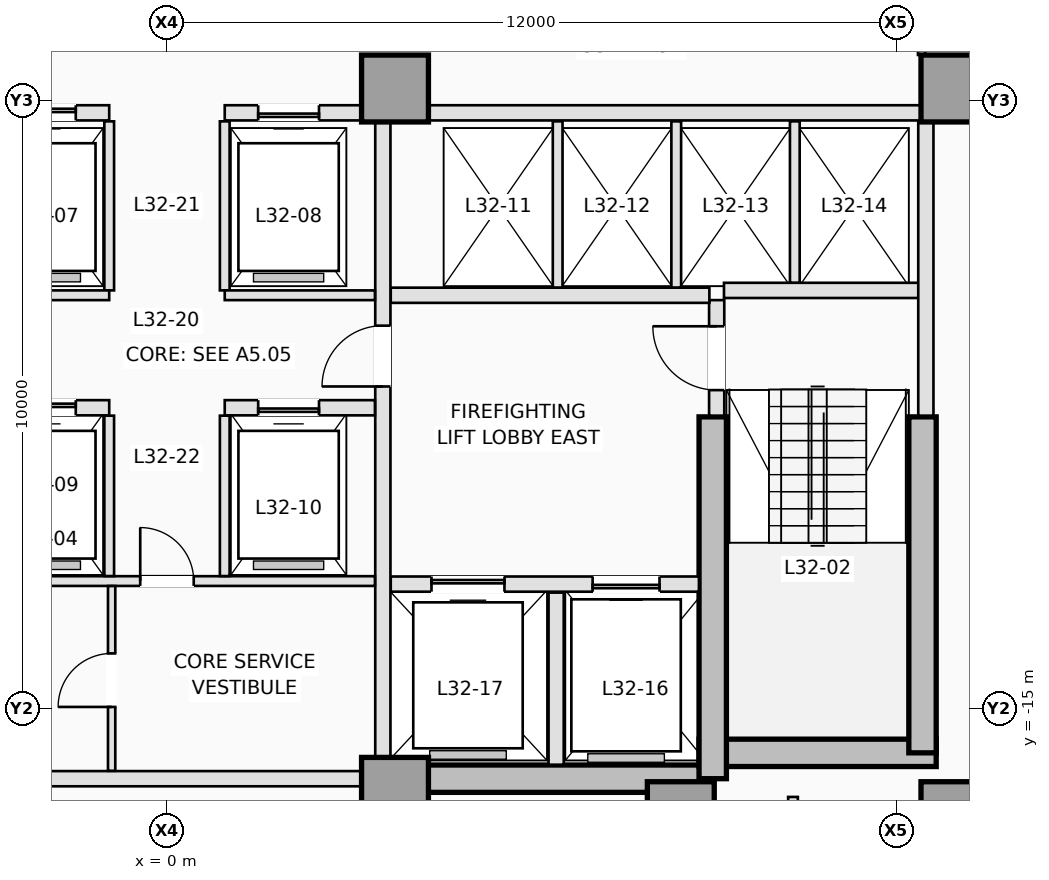
"""IFC4 building model, lengths in metres.
Left out: names, types, materials, properties, quantities, classifications, styles, units other than length and angle.
Written with IfcOpenShell. Run it as: python <this file> out.ifc"""

import sys

from ifc_helpers import new_model, si_unit, direction, frame, frame_2d, origin, origin_2d, place, context, subcontext, project, spatial, rectangle, extrude, element, fill, save


model = new_model("IFC4")
c1 = context("Model", 3, precision=1e-05, world=origin(), true_north=direction((0.0, 1.0)))
c2 = subcontext(c1, "Body", "Model", "MODEL_VIEW")
j1 = project(units=[si_unit("LENGTHUNIT", "METRE"), si_unit("PLANEANGLEUNIT", "RADIAN")], contexts=[c1])
p1 = place(None, origin())
s1 = spatial("IfcSite", under=j1, at=p1, CompositionType="ELEMENT")
p2 = place(p1, origin())
s2 = spatial("IfcBuilding", under=s1, at=p2, CompositionType="ELEMENT")
p3 = place(p2, frame((0.0, 0.0, 119.5)))
s3 = spatial("IfcBuildingStorey", under=s2, at=p3, CompositionType="ELEMENT", Elevation=119.5)
p4 = place(p3, frame((3.75, -16.15, 0.0), z_axis=(0.0, 0.0, 1.0), x_axis=(1.0, 0.0, 0.0)))
e1 = element("IfcWall", 1, at=p4, inside=s3, PredefinedType="SHEAR", context=c2, shape_type="SweptSolid", body=[
    extrude(rectangle(XDim=5.225, YDim=0.45, at=frame_2d((2.613, 0.0))), origin(), (0.0, 0.0, 1.0), 3.5),
])
p5 = place(p3, frame((8.75, -15.725, 0.0), z_axis=(0.0, 0.0, 1.0), x_axis=(1.0, 0.0, 0.0)))
e2 = element("IfcWall", 2, at=p5, inside=s3, PredefinedType="SHEAR", context=c2, shape_type="SweptSolid", body=[
    extrude(rectangle(XDim=3.9, YDim=0.45, at=frame_2d((1.95, 0.0))), origin(), (0.0, 0.0, 1.0), 3.5),
])
p6 = place(p3, frame((12.425, -15.725, 0.0), z_axis=(0.0, 0.0, 1.0), x_axis=(0.0, 1.0, 0.0)))
e3 = element("IfcWall", 3, at=p6, inside=s3, PredefinedType="SHEAR", context=c2, shape_type="SweptSolid", body=[
    extrude(rectangle(XDim=5.525, YDim=0.45, at=frame_2d((2.763, 0.0))), origin(), (0.0, 0.0, 1.0), 3.5),
])
p7 = place(p3, frame((8.975, -16.15, 0.0), z_axis=(0.0, 0.0, 1.0), x_axis=(0.0, 1.0, 0.0)))
e4 = element("IfcWall", 4, at=p7, inside=s3, PredefinedType="SHEAR", context=c2, shape_type="SweptSolid", body=[
    extrude(rectangle(XDim=5.95, YDim=0.45, at=frame_2d((2.975, 0.0))), origin(), (0.0, 0.0, 1.0), 3.5),
])
for number, where, z_axis, x_axis in (
    (5, (3.75, -16.35, 0.0), (0.0, 0.0, 1.0), (1.0, 0.0, 0.0)),
    (6, (8.45, -16.75, 0.0), (0.0, 0.0, 1.0), (1.0, 0.0, 0.0)),
    (7, (12.95, -16.75, 0.0), (0.0, 0.0, 1.0), (1.0, 0.0, 0.0)),
    (8, (3.75, -4.8, 0.0), (0.0, 0.0, 1.0), (1.0, 0.0, 0.0)),
    (9, (12.95, -4.8, 0.0), (0.0, 0.0, 1.0), (1.0, 0.0, 0.0)),
):
    element("IfcColumn", number, at=place(p3, frame(where, z_axis=z_axis, x_axis=x_axis)), inside=s3, PredefinedType="COLUMN", context=c2, shape_type="SweptSolid", body=[
        extrude(rectangle(XDim=1.1, YDim=1.1, at=origin_2d()), origin(), (0.0, 0.0, 1.0), 3.5),
    ])
p8 = place(p3, frame((9.04, -10.18, 0.0), z_axis=(0.0, 0.0, 1.0), x_axis=(0.0, 1.0, 0.0)))
e10 = element("IfcWall", 10, at=p8, inside=s3, PredefinedType="PARTITIONING", context=c2, shape_type="SweptSolid", body=[
    extrude(rectangle(XDim=1.9, YDim=0.25, at=frame_2d((0.95, 0.0))), origin(), (0.0, 0.0, 1.0), 3.25),
])
p9 = place(p8, frame((0.42, 0.0, 0.0)))
e11 = element("IfcOpeningElement", 11, at=p9, cuts=e10, PredefinedType="OPENING", context=c2, shape_type="SweptSolid", body=[
    extrude(rectangle(XDim=1.05, YDim=2.15, at=frame_2d((0.525, 1.075))), frame((0.0, 0.135, 0.0), z_axis=(0.0, -1.0, 0.0), x_axis=(1.0, 0.0, 0.0)), (0.0, 0.0, 1.0), 0.27),
])
p10 = place(p3, frame((9.16, -8.12, 0.0), z_axis=(0.0, 0.0, 1.0), x_axis=(1.0, 0.0, 0.0)))
e12 = element("IfcWall", 12, at=p10, inside=s3, PredefinedType="PARTITIONING", context=c2, shape_type="SweptSolid", body=[
    extrude(rectangle(XDim=3.22, YDim=0.25, at=frame_2d((1.61, 0.0))), origin(), (0.0, 0.0, 1.0), 3.25),
])
p11 = place(p3, frame((12.48, -10.18, 0.0), z_axis=(0.0, 0.0, 1.0), x_axis=(0.0, 1.0, 0.0)))
e13 = element("IfcWall", 13, at=p11, inside=s3, PredefinedType="PARTITIONING", context=c2, shape_type="SweptSolid", body=[
    extrude(rectangle(XDim=4.828, YDim=0.25, at=frame_2d((2.414, 0.0))), origin(), (0.0, 0.0, 1.0), 3.25),
])
p12 = place(p3, frame((3.68, -12.95, 0.0), z_axis=(0.0, 0.0, 1.0), x_axis=(1.0, 0.0, 0.0)))
e14 = element("IfcWall", 14, at=p12, inside=s3, PredefinedType="PARTITIONING", context=c2, shape_type="SweptSolid", body=[
    extrude(rectangle(XDim=5.068, YDim=0.25, at=frame_2d((2.534, 0.0))), origin(), (0.0, 0.0, 1.0), 3.25),
])
p13 = place(p12, frame((3.32, 0.0, 0.0)))
e15 = element("IfcOpeningElement", 15, at=p13, cuts=e14, PredefinedType="OPENING", context=c2, shape_type="SweptSolid", body=[
    extrude(rectangle(XDim=1.1, YDim=2.15, at=frame_2d((0.55, 1.075))), frame((0.0, 0.135, 0.0), z_axis=(0.0, -1.0, 0.0), x_axis=(1.0, 0.0, 0.0)), (0.0, 0.0, 1.0), 0.27),
])
p14 = place(p12, frame((0.67, 0.0, 0.0)))
e16 = element("IfcOpeningElement", 16, at=p14, cuts=e14, PredefinedType="OPENING", context=c2, shape_type="SweptSolid", body=[
    extrude(rectangle(XDim=1.2, YDim=2.15, at=frame_2d((0.6, 1.075))), frame((0.0, 0.135, 0.0), z_axis=(0.0, -1.0, 0.0), x_axis=(1.0, 0.0, 0.0)), (0.0, 0.0, 1.0), 0.27),
])
p15 = place(p3, frame((6.4, -15.92, 0.0), z_axis=(0.0, 0.0, 1.0), x_axis=(0.0, 1.0, 0.0)))
e17 = element("IfcWall", 17, at=p15, inside=s3, PredefinedType="PARTITIONING", context=c2, shape_type="SweptSolid", body=[
    extrude(rectangle(XDim=2.83, YDim=0.25, at=frame_2d((1.415, 0.0))), origin(), (0.0, 0.0, 1.0), 3.25),
])
p16 = place(p3, frame((3.68, -8.2, 0.0), z_axis=(0.0, 0.0, 1.0), x_axis=(1.0, 0.0, 0.0)))
e18 = element("IfcWall", 18, at=p16, inside=s3, PredefinedType="PARTITIONING", context=c2, shape_type="SweptSolid", body=[
    extrude(rectangle(XDim=5.24, YDim=0.25, at=frame_2d((2.62, 0.0))), origin(), (0.0, 0.0, 1.0), 3.25),
])
p17 = place(p3, frame((3.55, -15.798, 0.0), z_axis=(0.0, 0.0, 1.0), x_axis=(0.0, 1.0, 0.0)))
e19 = element("IfcWall", 19, at=p17, inside=s3, PredefinedType="PARTITIONING", context=c2, shape_type="SweptSolid", body=[
    extrude(rectangle(XDim=10.446, YDim=0.25, at=frame_2d((5.223, 0.0))), origin(), (0.0, 0.0, 1.0), 3.25),
])
p18 = place(p17, frame((6.098, 0.0, 0.0)))
e20 = element("IfcOpeningElement", 20, at=p18, cuts=e19, PredefinedType="OPENING", context=c2, shape_type="SweptSolid", body=[
    extrude(rectangle(XDim=1.0, YDim=2.15, at=frame_2d((0.5, 1.075))), frame((0.0, 0.135, 0.0), z_axis=(0.0, -1.0, 0.0), x_axis=(1.0, 0.0, 0.0)), (0.0, 0.0, 1.0), 0.27),
])
p19 = place(p3, frame((4.302, -5.2, 0.0), z_axis=(0.0, 0.0, 1.0), x_axis=(1.0, 0.0, 0.0)))
e21 = element("IfcWall", 21, at=p19, inside=s3, PredefinedType="PARTITIONING", context=c2, shape_type="SweptSolid", body=[
    extrude(rectangle(XDim=8.096, YDim=0.25, at=frame_2d((4.048, 0.0))), origin(), (0.0, 0.0, 1.0), 3.25),
])
p20 = place(p3, frame((-3.198, -5.2, 0.0), z_axis=(0.0, 0.0, 1.0), x_axis=(1.0, 0.0, 0.0)))
e22 = element("IfcWall", 22, at=p20, inside=s3, PredefinedType="PARTITIONING", context=c2, shape_type="SweptSolid", body=[
    extrude(rectangle(XDim=2.248, YDim=0.25, at=frame_2d((1.124, 0.0))), origin(), (0.0, 0.0, 1.0), 3.25),
])
p21 = place(p20, frame((0.698, 0.0, 0.0)))
e23 = element("IfcOpeningElement", 23, at=p21, cuts=e22, PredefinedType="OPENING", context=c2, shape_type="SweptSolid", body=[
    extrude(rectangle(XDim=1.0, YDim=2.15, at=frame_2d((0.5, 1.075))), frame((0.0, 0.135, 0.0), z_axis=(0.0, -1.0, 0.0), x_axis=(1.0, 0.0, 0.0)), (0.0, 0.0, 1.0), 0.27),
])
p22 = place(p3, frame((0.95, -5.2, 0.0), z_axis=(0.0, 0.0, 1.0), x_axis=(1.0, 0.0, 0.0)))
e24 = element("IfcWall", 24, at=p22, inside=s3, PredefinedType="PARTITIONING", context=c2, shape_type="SweptSolid", body=[
    extrude(rectangle(XDim=2.248, YDim=0.25, at=frame_2d((1.124, 0.0))), origin(), (0.0, 0.0, 1.0), 3.25),
])
p23 = place(p22, frame((0.55, 0.0, 0.0)))
e25 = element("IfcOpeningElement", 25, at=p23, cuts=e24, PredefinedType="OPENING", context=c2, shape_type="SweptSolid", body=[
    extrude(rectangle(XDim=1.0, YDim=2.15, at=frame_2d((0.5, 1.075))), frame((0.0, 0.135, 0.0), z_axis=(0.0, -1.0, 0.0), x_axis=(1.0, 0.0, 0.0)), (0.0, 0.0, 1.0), 0.27),
])
for number, where, z_axis, x_axis in (
    (26, (6.425, -8.073, 0.0), (0.0, 0.0, 1.0), (0.0, 1.0, 0.0)),
    (27, (8.375, -8.073, 0.0), (0.0, 0.0, 1.0), (0.0, 1.0, 0.0)),
):
    element("IfcWall", number, at=place(p3, frame(where, z_axis=z_axis, x_axis=x_axis)), inside=s3, PredefinedType="PARTITIONING", context=c2, shape_type="SweptSolid", body=[
        extrude(rectangle(XDim=2.733, YDim=0.16, at=frame_2d((1.366, 0.0))), origin(), (0.0, 0.0, 1.0), 3.25),
    ])
p24 = place(p3, frame((10.325, -7.993, 0.0), z_axis=(0.0, 0.0, 1.0), x_axis=(0.0, 1.0, 0.0)))
e28 = element("IfcWall", 28, at=p24, inside=s3, PredefinedType="PARTITIONING", context=c2, shape_type="SweptSolid", body=[
    extrude(rectangle(XDim=2.653, YDim=0.16, at=frame_2d((1.326, 0.0))), origin(), (0.0, 0.0, 1.0), 3.25),
])
p25 = place(p3, frame((-3.198, -16.15, 0.0), z_axis=(0.0, 0.0, 1.0), x_axis=(1.0, 0.0, 0.0)))
e29 = element("IfcWall", 29, at=p25, inside=s3, PredefinedType="PARTITIONING", context=c2, shape_type="SweptSolid", body=[
    extrude(rectangle(XDim=6.396, YDim=0.25, at=frame_2d((3.198, 0.0))), origin(), (0.0, 0.0, 1.0), 2.3),
])
for number, where, z_axis, x_axis in (
    (30, (-0.95, -8.12, 0.0), (0.0, 0.0, 1.0), (0.0, 1.0, 0.0)),
    (31, (0.95, -8.12, 0.0), (0.0, 0.0, 1.0), (0.0, 1.0, 0.0)),
):
    element("IfcWall", number, at=place(p3, frame(where, z_axis=z_axis, x_axis=x_axis)), inside=s3, PredefinedType="PARTITIONING", context=c2, shape_type="SweptSolid", body=[
        extrude(rectangle(XDim=2.78, YDim=0.16, at=frame_2d((1.39, 0.0))), origin(), (0.0, 0.0, 1.0), 3.25),
    ])
for number, where, z_axis, x_axis in (
    (32, (-3.42, -8.2, 0.0), (0.0, 0.0, 1.0), (1.0, 0.0, 0.0)),
    (33, (0.95, -8.2, 0.0), (0.0, 0.0, 1.0), (1.0, 0.0, 0.0)),
):
    element("IfcWall", number, at=place(p3, frame(where, z_axis=z_axis, x_axis=x_axis)), inside=s3, PredefinedType="PARTITIONING", context=c2, shape_type="SweptSolid", body=[
        extrude(rectangle(XDim=2.47, YDim=0.16, at=frame_2d((1.235, 0.0))), origin(), (0.0, 0.0, 1.0), 3.25),
    ])
p26 = place(p3, frame((-3.42, -10.05, 0.0), z_axis=(0.0, 0.0, 1.0), x_axis=(1.0, 0.0, 0.0)))
e34 = element("IfcWall", 34, at=p26, inside=s3, PredefinedType="PARTITIONING", context=c2, shape_type="SweptSolid", body=[
    extrude(rectangle(XDim=2.47, YDim=0.25, at=frame_2d((1.235, 0.0))), origin(), (0.0, 0.0, 1.0), 3.25),
])
p27 = place(p26, frame((0.92, 0.0, 0.0)))
e35 = element("IfcOpeningElement", 35, at=p27, cuts=e34, PredefinedType="OPENING", context=c2, shape_type="SweptSolid", body=[
    extrude(rectangle(XDim=1.0, YDim=2.15, at=frame_2d((0.5, 1.075))), frame((0.0, 0.135, 0.0), z_axis=(0.0, -1.0, 0.0), x_axis=(1.0, 0.0, 0.0)), (0.0, 0.0, 1.0), 0.27),
])
p28 = place(p3, frame((0.95, -10.05, 0.0), z_axis=(0.0, 0.0, 1.0), x_axis=(1.0, 0.0, 0.0)))
e36 = element("IfcWall", 36, at=p28, inside=s3, PredefinedType="PARTITIONING", context=c2, shape_type="SweptSolid", body=[
    extrude(rectangle(XDim=2.47, YDim=0.25, at=frame_2d((1.235, 0.0))), origin(), (0.0, 0.0, 1.0), 3.25),
])
p29 = place(p28, frame((0.55, 0.0, 0.0)))
e37 = element("IfcOpeningElement", 37, at=p29, cuts=e36, PredefinedType="OPENING", context=c2, shape_type="SweptSolid", body=[
    extrude(rectangle(XDim=1.0, YDim=2.15, at=frame_2d((0.5, 1.075))), frame((0.0, 0.135, 0.0), z_axis=(0.0, -1.0, 0.0), x_axis=(1.0, 0.0, 0.0)), (0.0, 0.0, 1.0), 0.27),
])
p30 = place(p3, frame((-3.42, -12.9, 0.0), z_axis=(0.0, 0.0, 1.0), x_axis=(1.0, 0.0, 0.0)))
e38 = element("IfcWall", 38, at=p30, inside=s3, PredefinedType="PARTITIONING", context=c2, shape_type="SweptSolid", body=[
    extrude(rectangle(XDim=6.84, YDim=0.16, at=frame_2d((3.42, 0.0))), origin(), (0.0, 0.0, 1.0), 3.25),
])
p31 = place(p30, frame((2.98, 0.0, 0.0)))
e39 = element("IfcOpeningElement", 39, at=p31, cuts=e38, PredefinedType="OPENING", context=c2, shape_type="SweptSolid", body=[
    extrude(rectangle(XDim=0.88, YDim=2.12, at=frame_2d((0.44, 1.06))), frame((0.0, 0.09, 0.0), z_axis=(0.0, -1.0, 0.0), x_axis=(1.0, 0.0, 0.0)), (0.0, 0.0, 1.0), 0.18),
])
for number, where, z_axis, x_axis in (
    (40, (-0.95, -12.818, 0.0), (0.0, 0.0, 1.0), (0.0, 1.0, 0.0)),
    (41, (0.95, -12.818, 0.0), (0.0, 0.0, 1.0), (0.0, 1.0, 0.0)),
):
    element("IfcWall", number, at=place(p3, frame(where, z_axis=z_axis, x_axis=x_axis)), inside=s3, PredefinedType="PARTITIONING", context=c2, shape_type="SweptSolid", body=[
        extrude(rectangle(XDim=2.638, YDim=0.16, at=frame_2d((1.319, 0.0))), origin(), (0.0, 0.0, 1.0), 3.25),
    ])
p32 = place(p3, frame((-0.91, -16.02, 0.0), z_axis=(0.0, 0.0, 1.0), x_axis=(0.0, 1.0, 0.0)))
e42 = element("IfcWall", 42, at=p32, inside=s3, PredefinedType="PARTITIONING", context=c2, shape_type="SweptSolid", body=[
    extrude(rectangle(XDim=3.038, YDim=0.12, at=frame_2d((1.519, 0.0))), origin(), (0.0, 0.0, 1.0), 3.25),
])
p33 = place(p32, frame((1.05, 0.0, 0.0)))
e43 = element("IfcOpeningElement", 43, at=p33, cuts=e42, PredefinedType="OPENING", context=c2, shape_type="SweptSolid", body=[
    extrude(rectangle(XDim=0.88, YDim=2.12, at=frame_2d((0.44, 1.06))), frame((0.0, 0.07, 0.0), z_axis=(0.0, -1.0, 0.0), x_axis=(1.0, 0.0, 0.0)), (0.0, 0.0, 1.0), 0.14),
])
p34 = place(p3, frame((12.41, -2.462, 0.0), z_axis=(0.0, 0.0, 1.0), x_axis=(0.0, -1.0, 0.0)))
e44 = element("IfcWall", 44, at=p34, inside=s3, PredefinedType="PARTITIONING", context=c2, shape_type="SweptSolid", body=[
    extrude(rectangle(XDim=1.786, YDim=0.12, at=frame_2d((0.893, 0.0))), origin(), (0.0, 0.0, 1.0), 3.25),
])
p35 = place(p34, frame((0.623, 0.0, 0.0)))
e45 = element("IfcOpeningElement", 45, at=p35, cuts=e44, PredefinedType="OPENING", context=c2, shape_type="SweptSolid", body=[
    extrude(rectangle(XDim=0.92, YDim=2.12, at=frame_2d((0.46, 1.06))), frame((0.0, 0.07, 0.0), z_axis=(0.0, -1.0, 0.0), x_axis=(1.0, 0.0, 0.0)), (0.0, 0.0, 1.0), 0.14),
])
p36 = place(p3, frame((10.295, -19.698, 0.0), z_axis=(0.0, 0.0, 1.0), x_axis=(0.0, 1.0, 0.0)))
e46 = element("IfcWall", 46, at=p36, inside=s3, PredefinedType="PARTITIONING", context=c2, shape_type="SweptSolid", body=[
    extrude(rectangle(XDim=3.248, YDim=0.16, at=frame_2d((1.624, 0.0))), origin(), (0.0, 0.0, 1.0), 3.25),
])
p37 = place(p21, origin())
e47 = element("IfcDoor", 47, at=p37, inside=s3, OperationType="SLIDING_TO_LEFT", PredefinedType="DOOR", context=c2, shape_type="SweptSolid", body=[
    extrude(rectangle(XDim=1.0, YDim=2.15, at=frame_2d((0.5, 1.075))), frame((0.0, 0.025, 0.0), z_axis=(0.0, -1.0, 0.0), x_axis=(1.0, 0.0, 0.0)), (0.0, 0.0, 1.0), 0.05),
])
fill(e23, e47)
p38 = place(p23, origin())
e48 = element("IfcDoor", 48, at=p38, inside=s3, OperationType="SLIDING_TO_RIGHT", PredefinedType="DOOR", context=c2, shape_type="SweptSolid", body=[
    extrude(rectangle(XDim=1.0, YDim=2.15, at=frame_2d((0.5, 1.075))), frame((0.0, 0.025, 0.0), z_axis=(0.0, -1.0, 0.0), x_axis=(1.0, 0.0, 0.0)), (0.0, 0.0, 1.0), 0.05),
])
fill(e25, e48)
p39 = place(p13, origin())
e49 = element("IfcDoor", 49, at=p39, inside=s3, OperationType="SLIDING_TO_RIGHT", PredefinedType="DOOR", context=c2, shape_type="SweptSolid", body=[
    extrude(rectangle(XDim=1.1, YDim=2.15, at=frame_2d((0.55, 1.075))), frame((0.0, 0.025, 0.0), z_axis=(0.0, -1.0, 0.0), x_axis=(1.0, 0.0, 0.0)), (0.0, 0.0, 1.0), 0.05),
])
fill(e15, e49)
p40 = place(p14, origin())
e50 = element("IfcDoor", 50, at=p40, inside=s3, OperationType="SLIDING_TO_LEFT", PredefinedType="DOOR", context=c2, shape_type="SweptSolid", body=[
    extrude(rectangle(XDim=1.2, YDim=2.15, at=frame_2d((0.6, 1.075))), frame((0.0, 0.025, 0.0), z_axis=(0.0, -1.0, 0.0), x_axis=(1.0, 0.0, 0.0)), (0.0, 0.0, 1.0), 0.05),
])
fill(e16, e50)
p41 = place(p27, origin())
e51 = element("IfcDoor", 51, at=p41, inside=s3, OperationType="SLIDING_TO_LEFT", PredefinedType="DOOR", context=c2, shape_type="SweptSolid", body=[
    extrude(rectangle(XDim=1.0, YDim=2.15, at=frame_2d((0.5, 1.075))), frame((0.0, 0.025, 0.0), z_axis=(0.0, -1.0, 0.0), x_axis=(1.0, 0.0, 0.0)), (0.0, 0.0, 1.0), 0.05),
])
fill(e35, e51)
p42 = place(p29, origin())
e52 = element("IfcDoor", 52, at=p42, inside=s3, OperationType="SLIDING_TO_RIGHT", PredefinedType="DOOR", context=c2, shape_type="SweptSolid", body=[
    extrude(rectangle(XDim=1.0, YDim=2.15, at=frame_2d((0.5, 1.075))), frame((0.0, 0.025, 0.0), z_axis=(0.0, -1.0, 0.0), x_axis=(1.0, 0.0, 0.0)), (0.0, 0.0, 1.0), 0.05),
])
fill(e37, e52)
p43 = place(p9, origin())
e53 = element("IfcDoor", 53, at=p43, inside=s3, OperationType="SINGLE_SWING_RIGHT", PredefinedType="DOOR", context=c2, shape_type="SweptSolid", body=[
    extrude(rectangle(XDim=1.05, YDim=2.15, at=frame_2d((0.525, 1.075))), frame((0.0, 0.025, 0.0), z_axis=(0.0, -1.0, 0.0), x_axis=(1.0, 0.0, 0.0)), (0.0, 0.0, 1.0), 0.05),
])
fill(e11, e53)
p44 = place(p18, origin())
e54 = element("IfcDoor", 54, at=p44, inside=s3, OperationType="SINGLE_SWING_LEFT", PredefinedType="DOOR", context=c2, shape_type="SweptSolid", body=[
    extrude(rectangle(XDim=1.0, YDim=2.15, at=frame_2d((0.5, 1.075))), frame((0.0, 0.025, 0.0), z_axis=(0.0, -1.0, 0.0), x_axis=(1.0, 0.0, 0.0)), (0.0, 0.0, 1.0), 0.05),
])
fill(e20, e54)
p45 = place(p31, origin())
e55 = element("IfcDoor", 55, at=p45, inside=s3, OperationType="SINGLE_SWING_LEFT", PredefinedType="DOOR", context=c2, shape_type="SweptSolid", body=[
    extrude(rectangle(XDim=0.88, YDim=2.12, at=frame_2d((0.44, 1.06))), frame((0.0, 0.025, 0.0), z_axis=(0.0, -1.0, 0.0), x_axis=(1.0, 0.0, 0.0)), (0.0, 0.0, 1.0), 0.05),
])
fill(e39, e55)
p46 = place(p33, origin())
e56 = element("IfcDoor", 56, at=p46, inside=s3, OperationType="SINGLE_SWING_LEFT", PredefinedType="DOOR", context=c2, shape_type="SweptSolid", body=[
    extrude(rectangle(XDim=0.88, YDim=2.12, at=frame_2d((0.44, 1.06))), frame((0.0, 0.025, 0.0), z_axis=(0.0, -1.0, 0.0), x_axis=(1.0, 0.0, 0.0)), (0.0, 0.0, 1.0), 0.05),
])
fill(e43, e56)
save(model, sys.argv[1])
